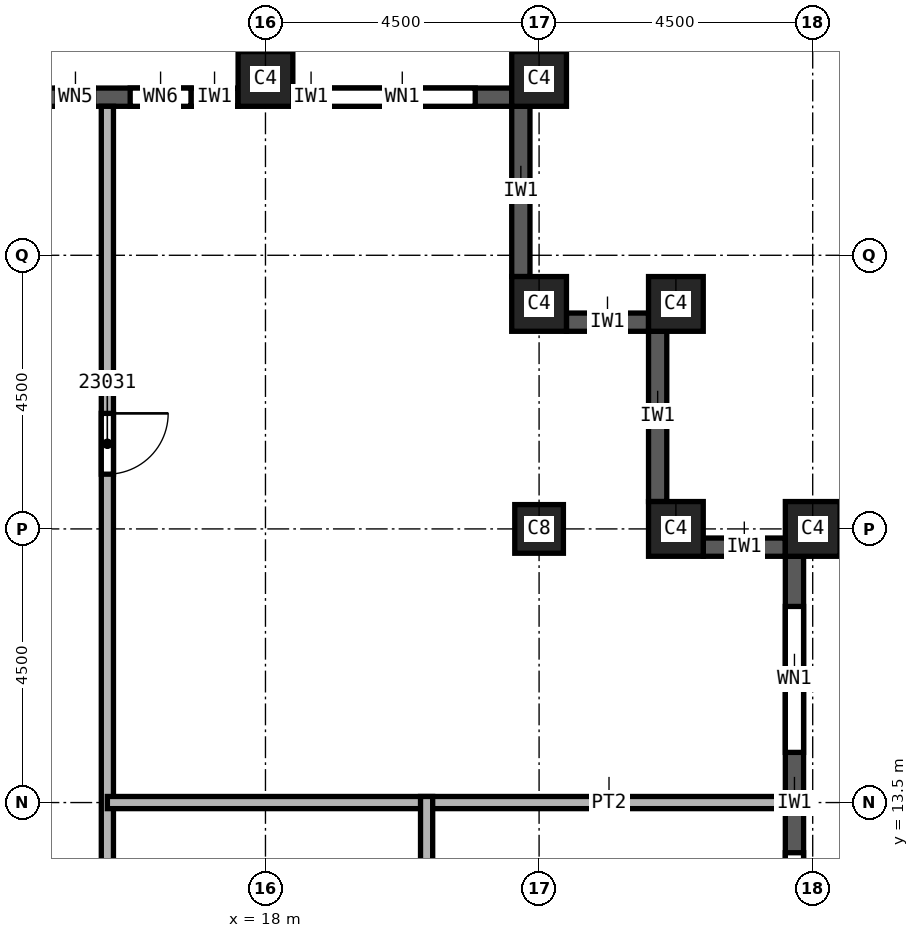
"""IFC4 building model, lengths in metres.
Left out: names, types, materials, properties, quantities, classifications, styles, units other than length and angle.
Written with IfcOpenShell. Run it as: python <this file> out.ifc"""

import sys

from ifc_helpers import new_model, si_unit, direction, frame, frame_2d, origin, origin_2d, place, context, subcontext, project, spatial, rectangle, extrude, element, fill, save


model = new_model("IFC4")
c1 = context("Model", 3, precision=1e-05, world=origin(), true_north=direction((0.0, 1.0)))
c2 = subcontext(c1, "Body", "Model", "MODEL_VIEW")
j1 = project(units=[si_unit("LENGTHUNIT", "METRE"), si_unit("PLANEANGLEUNIT", "RADIAN")], contexts=[c1])
p1 = place(None, origin())
s1 = spatial("IfcSite", under=j1, at=p1, CompositionType="ELEMENT")
p2 = place(p1, origin())
s2 = spatial("IfcBuilding", under=s1, at=p2, CompositionType="ELEMENT")
p3 = place(p2, frame((0.0, 0.0, 330.0)))
s3 = spatial("IfcBuildingStorey", under=s2, at=p3, CompositionType="ELEMENT", Elevation=330.0)
p4 = place(p3, frame((22.5, 18.0, 0.0), z_axis=(0.0, 0.0, 1.0), x_axis=(1.0, 0.0, 0.0)))
e1 = element("IfcColumn", 1, at=p4, inside=s3, PredefinedType="COLUMN", context=c2, shape_type="SweptSolid", body=[
    extrude(rectangle(XDim=0.8, YDim=0.8, at=origin_2d()), origin(), (0.0, 0.0, 1.0), 3.74),
])
for number, where, z_axis, x_axis in (
    (2, (27.0, 18.0, 0.0), (0.0, 0.0, 1.0), (0.0, 1.0, 0.0)),
    (3, (18.0, 25.4, 0.0), (0.0, 0.0, 1.0), (1.0, 0.0, 0.0)),
    (4, (22.5, 25.4, 0.0), (0.0, 0.0, 1.0), (1.0, 0.0, 0.0)),
    (5, (22.5, 21.7, 0.0), (0.0, 0.0, 1.0), (1.0, 0.0, 0.0)),
    (6, (24.75, 21.7, 0.0), (0.0, 0.0, 1.0), (1.0, 0.0, 0.0)),
    (7, (24.75, 18.0, 0.0), (0.0, 0.0, 1.0), (1.0, 0.0, 0.0)),
):
    element("IfcColumn", number, at=place(p3, frame(where, z_axis=z_axis, x_axis=x_axis)), inside=s3, PredefinedType="COLUMN", context=c2, shape_type="SweptSolid", body=[
        extrude(rectangle(XDim=0.9, YDim=0.9, at=origin_2d()), origin(), (0.0, 0.0, 1.0), 3.74),
    ])
p5 = place(p3, frame((26.7, 9.45, 0.0), z_axis=(0.0, 0.0, 1.0), x_axis=(0.0, 1.0, 0.0)))
e8 = element("IfcWall", 8, at=p5, inside=s3, PredefinedType="SOLIDWALL", context=c2, shape_type="SweptSolid", body=[
    extrude(rectangle(XDim=8.1, YDim=0.3, at=frame_2d((4.05, 0.0))), origin(), (0.0, 0.0, 1.0), 3.14),
])
p6 = place(p5, frame((0.825, 0.0, 0.8)))
e9 = element("IfcOpeningElement", 9, at=p6, cuts=e8, PredefinedType="OPENING", context=c2, shape_type="SweptSolid", body=[
    extrude(rectangle(XDim=2.4, YDim=1.95, at=frame_2d((1.2, 0.975))), frame((0.0, 0.15, 0.0), z_axis=(0.0, -1.0, 0.0), x_axis=(1.0, 0.0, 0.0)), (0.0, 0.0, 1.0), 0.3),
])
p7 = place(p5, frame((4.875, 0.0, 0.8)))
e10 = element("IfcOpeningElement", 10, at=p7, cuts=e8, PredefinedType="OPENING", context=c2, shape_type="SweptSolid", body=[
    extrude(rectangle(XDim=2.4, YDim=1.95, at=frame_2d((1.2, 0.975))), frame((0.0, 0.15, 0.0), z_axis=(0.0, -1.0, 0.0), x_axis=(1.0, 0.0, 0.0)), (0.0, 0.0, 1.0), 0.3),
])
p8 = place(p3, frame((26.55, 17.7, 0.0), z_axis=(0.0, 0.0, 1.0), x_axis=(-1.0, 0.0, 0.0)))
e11 = element("IfcWall", 11, at=p8, inside=s3, PredefinedType="SOLIDWALL", context=c2, shape_type="SweptSolid", body=[
    extrude(rectangle(XDim=1.35, YDim=0.3, at=frame_2d((0.675, 0.0))), origin(), (0.0, 0.0, 1.0), 3.14),
])
p9 = place(p3, frame((24.45, 18.45, 0.0), z_axis=(0.0, 0.0, 1.0), x_axis=(0.0, 1.0, 0.0)))
e12 = element("IfcWall", 12, at=p9, inside=s3, PredefinedType="SOLIDWALL", context=c2, shape_type="SweptSolid", body=[
    extrude(rectangle(XDim=2.8, YDim=0.3, at=frame_2d((1.4, 0.0))), origin(), (0.0, 0.0, 1.0), 3.14),
])
p10 = place(p3, frame((24.3, 21.4, 0.0), z_axis=(0.0, 0.0, 1.0), x_axis=(-1.0, 0.0, 0.0)))
e13 = element("IfcWall", 13, at=p10, inside=s3, PredefinedType="SOLIDWALL", context=c2, shape_type="SweptSolid", body=[
    extrude(rectangle(XDim=1.35, YDim=0.3, at=frame_2d((0.675, 0.0))), origin(), (0.0, 0.0, 1.0), 3.14),
])
p11 = place(p3, frame((22.2, 22.15, 0.0), z_axis=(0.0, 0.0, 1.0), x_axis=(0.0, 1.0, 0.0)))
e14 = element("IfcWall", 14, at=p11, inside=s3, PredefinedType="SOLIDWALL", context=c2, shape_type="SweptSolid", body=[
    extrude(rectangle(XDim=2.8, YDim=0.3, at=frame_2d((1.4, 0.0))), origin(), (0.0, 0.0, 1.0), 3.14),
])
p12 = place(p3, frame((22.05, 25.1, 0.0), z_axis=(0.0, 0.0, 1.0), x_axis=(-1.0, 0.0, 0.0)))
e15 = element("IfcWall", 15, at=p12, inside=s3, PredefinedType="SOLIDWALL", context=c2, shape_type="SweptSolid", body=[
    extrude(rectangle(XDim=3.6, YDim=0.3, at=frame_2d((1.8, 0.0))), origin(), (0.0, 0.0, 1.0), 3.14),
])
p13 = place(p12, frame((0.6, 0.0, 0.8)))
e16 = element("IfcOpeningElement", 16, at=p13, cuts=e15, PredefinedType="OPENING", context=c2, shape_type="SweptSolid", body=[
    extrude(rectangle(XDim=2.4, YDim=1.95, at=frame_2d((1.2, 0.975))), frame((0.0, 0.15, 0.0), z_axis=(0.0, -1.0, 0.0), x_axis=(1.0, 0.0, 0.0)), (0.0, 0.0, 1.0), 0.3),
])
p14 = place(p3, frame((17.55, 25.1, 0.0), z_axis=(0.0, 0.0, 1.0), x_axis=(-1.0, 0.0, 0.0)))
e17 = element("IfcWall", 17, at=p14, inside=s3, PredefinedType="SOLIDWALL", context=c2, shape_type="SweptSolid", body=[
    extrude(rectangle(XDim=3.6, YDim=0.3, at=frame_2d((1.8, 0.0))), origin(), (0.0, 0.0, 1.0), 3.14),
])
p15 = place(p14, frame((0.775, 0.0, 0.8)))
e18 = element("IfcOpeningElement", 18, at=p15, cuts=e17, PredefinedType="OPENING", context=c2, shape_type="SweptSolid", body=[
    extrude(rectangle(XDim=1.0, YDim=1.95, at=frame_2d((0.5, 0.975))), frame((0.0, 0.15, 0.0), z_axis=(0.0, -1.0, 0.0), x_axis=(1.0, 0.0, 0.0)), (0.0, 0.0, 1.0), 0.3),
])
p16 = place(p14, frame((2.375, 0.0, 0.8)))
e19 = element("IfcOpeningElement", 19, at=p16, cuts=e17, PredefinedType="OPENING", context=c2, shape_type="SweptSolid", body=[
    extrude(rectangle(XDim=0.6, YDim=1.95, at=frame_2d((0.3, 0.975))), frame((0.0, 0.15, 0.0), z_axis=(0.0, -1.0, 0.0), x_axis=(1.0, 0.0, 0.0)), (0.0, 0.0, 1.0), 0.3),
])
p17 = place(p3, frame((15.4, 24.95, 0.0), z_axis=(0.0, 0.0, 1.0), x_axis=(0.0, -1.0, 0.0)))
e20 = element("IfcWall", 20, at=p17, inside=s3, PredefinedType="PARTITIONING", context=c2, shape_type="SweptSolid", body=[
    extrude(rectangle(XDim=49.9, YDim=0.2, at=frame_2d((24.95, 0.0))), origin(), (0.0, 0.0, 1.0), 3.74),
])
p18 = place(p17, frame((20.45, 0.0, 0.0)))
e21 = element("IfcOpeningElement", 21, at=p18, cuts=e20, PredefinedType="OPENING", context=c2, shape_type="SweptSolid", body=[
    extrude(rectangle(XDim=1.0, YDim=2.1, at=frame_2d((0.5, 1.05))), frame((0.0, 0.1, 0.0), z_axis=(0.0, -1.0, 0.0), x_axis=(1.0, 0.0, 0.0)), (0.0, 0.0, 1.0), 0.2),
])
p19 = place(p17, frame((5.05, 0.0, 0.0)))
e22 = element("IfcOpeningElement", 22, at=p19, cuts=e20, PredefinedType="OPENING", context=c2, shape_type="SweptSolid", body=[
    extrude(rectangle(XDim=1.0, YDim=2.1, at=frame_2d((0.5, 1.05))), frame((0.0, 0.1, 0.0), z_axis=(0.0, -1.0, 0.0), x_axis=(1.0, 0.0, 0.0)), (0.0, 0.0, 1.0), 0.2),
])
p20 = place(p17, frame((45.95, 0.0, 0.0)))
e23 = element("IfcOpeningElement", 23, at=p20, cuts=e20, PredefinedType="OPENING", context=c2, shape_type="SweptSolid", body=[
    extrude(rectangle(XDim=1.0, YDim=2.1, at=frame_2d((0.5, 1.05))), frame((0.0, 0.1, 0.0), z_axis=(0.0, -1.0, 0.0), x_axis=(1.0, 0.0, 0.0)), (0.0, 0.0, 1.0), 0.2),
])
p21 = place(p17, frame((35.9, 0.0, 0.0)))
e24 = element("IfcOpeningElement", 24, at=p21, cuts=e20, PredefinedType="OPENING", context=c2, shape_type="SweptSolid", body=[
    extrude(rectangle(XDim=1.0, YDim=2.1, at=frame_2d((0.5, 1.05))), frame((0.0, 0.1, 0.0), z_axis=(0.0, -1.0, 0.0), x_axis=(1.0, 0.0, 0.0)), (0.0, 0.0, 1.0), 0.2),
])
p22 = place(p17, frame((25.1, 0.0, 0.0)))
e25 = element("IfcOpeningElement", 25, at=p22, cuts=e20, PredefinedType="OPENING", context=c2, shape_type="SweptSolid", body=[
    extrude(rectangle(XDim=1.0, YDim=2.1, at=frame_2d((0.5, 1.05))), frame((0.0, 0.1, 0.0), z_axis=(0.0, -1.0, 0.0), x_axis=(1.0, 0.0, 0.0)), (0.0, 0.0, 1.0), 0.2),
])
p23 = place(p3, frame((15.4, 13.5, 0.0), z_axis=(0.0, 0.0, 1.0), x_axis=(1.0, 0.0, 0.0)))
e26 = element("IfcWall", 26, at=p23, inside=s3, PredefinedType="PARTITIONING", context=c2, shape_type="SweptSolid", body=[
    extrude(rectangle(XDim=11.15, YDim=0.2, at=frame_2d((5.575, 0.0))), origin(), (0.0, 0.0, 1.0), 3.74),
])
p24 = place(p3, frame((20.65, 13.6, 0.0), z_axis=(0.0, 0.0, 1.0), x_axis=(0.0, -1.0, 0.0)))
e27 = element("IfcWall", 27, at=p24, inside=s3, PredefinedType="PARTITIONING", context=c2, shape_type="SweptSolid", body=[
    extrude(rectangle(XDim=20.35, YDim=0.2, at=frame_2d((10.175, 0.0))), origin(), (0.0, 0.0, 1.0), 3.74),
])
p25 = place(p24, frame((8.2, 0.0, 0.0)))
e28 = element("IfcOpeningElement", 28, at=p25, cuts=e27, PredefinedType="OPENING", context=c2, shape_type="SweptSolid", body=[
    extrude(rectangle(XDim=1.0, YDim=2.1, at=frame_2d((0.5, 1.05))), frame((0.0, 0.1, 0.0), z_axis=(0.0, -1.0, 0.0), x_axis=(1.0, 0.0, 0.0)), (0.0, 0.0, 1.0), 0.2),
])
p26 = place(p24, frame((19.1, 0.0, 0.0)))
e29 = element("IfcOpeningElement", 29, at=p26, cuts=e27, PredefinedType="OPENING", context=c2, shape_type="SweptSolid", body=[
    extrude(rectangle(XDim=1.0, YDim=2.1, at=frame_2d((0.5, 1.05))), frame((0.0, 0.1, 0.0), z_axis=(0.0, -1.0, 0.0), x_axis=(1.0, 0.0, 0.0)), (0.0, 0.0, 1.0), 0.2),
])
p27 = place(p6, origin())
e30 = element("IfcWindow", 30, at=p27, inside=s3, PartitioningType="SINGLE_PANEL", PredefinedType="WINDOW", context=c2, shape_type="SweptSolid", body=[
    extrude(rectangle(XDim=2.4, YDim=1.95, at=frame_2d((1.2, 0.975))), frame((0.0, 0.03, 0.0), z_axis=(0.0, -1.0, 0.0), x_axis=(1.0, 0.0, 0.0)), (0.0, 0.0, 1.0), 0.06),
])
fill(e9, e30)
p28 = place(p7, origin())
e31 = element("IfcWindow", 31, at=p28, inside=s3, PartitioningType="SINGLE_PANEL", PredefinedType="WINDOW", context=c2, shape_type="SweptSolid", body=[
    extrude(rectangle(XDim=2.4, YDim=1.95, at=frame_2d((1.2, 0.975))), frame((0.0, 0.03, 0.0), z_axis=(0.0, -1.0, 0.0), x_axis=(1.0, 0.0, 0.0)), (0.0, 0.0, 1.0), 0.06),
])
fill(e10, e31)
p29 = place(p13, origin())
e32 = element("IfcWindow", 32, at=p29, inside=s3, PartitioningType="SINGLE_PANEL", PredefinedType="WINDOW", context=c2, shape_type="SweptSolid", body=[
    extrude(rectangle(XDim=2.4, YDim=1.95, at=frame_2d((1.2, 0.975))), frame((0.0, 0.03, 0.0), z_axis=(0.0, -1.0, 0.0), x_axis=(1.0, 0.0, 0.0)), (0.0, 0.0, 1.0), 0.06),
])
fill(e16, e32)
p30 = place(p19, origin())
e33 = element("IfcDoor", 33, at=p30, inside=s3, OperationType="SINGLE_SWING_RIGHT", PredefinedType="DOOR", context=c2, shape_type="SweptSolid", body=[
    extrude(rectangle(XDim=1.0, YDim=2.1, at=frame_2d((0.5, 1.05))), frame((0.0, 0.025, 0.0), z_axis=(0.0, -1.0, 0.0), x_axis=(1.0, 0.0, 0.0)), (0.0, 0.0, 1.0), 0.05),
])
fill(e22, e33)
p31 = place(p15, origin())
e34 = element("IfcWindow", 34, at=p31, inside=s3, PartitioningType="SINGLE_PANEL", PredefinedType="WINDOW", context=c2, shape_type="SweptSolid", body=[
    extrude(rectangle(XDim=1.0, YDim=1.95, at=frame_2d((0.5, 0.975))), frame((0.0, 0.03, 0.0), z_axis=(0.0, -1.0, 0.0), x_axis=(1.0, 0.0, 0.0)), (0.0, 0.0, 1.0), 0.06),
])
fill(e18, e34)
p32 = place(p16, origin())
e35 = element("IfcWindow", 35, at=p32, inside=s3, PartitioningType="SINGLE_PANEL", PredefinedType="WINDOW", context=c2, shape_type="SweptSolid", body=[
    extrude(rectangle(XDim=0.6, YDim=1.95, at=frame_2d((0.3, 0.975))), frame((0.0, 0.03, 0.0), z_axis=(0.0, -1.0, 0.0), x_axis=(1.0, 0.0, 0.0)), (0.0, 0.0, 1.0), 0.06),
])
fill(e19, e35)
save(model, sys.argv[1])
